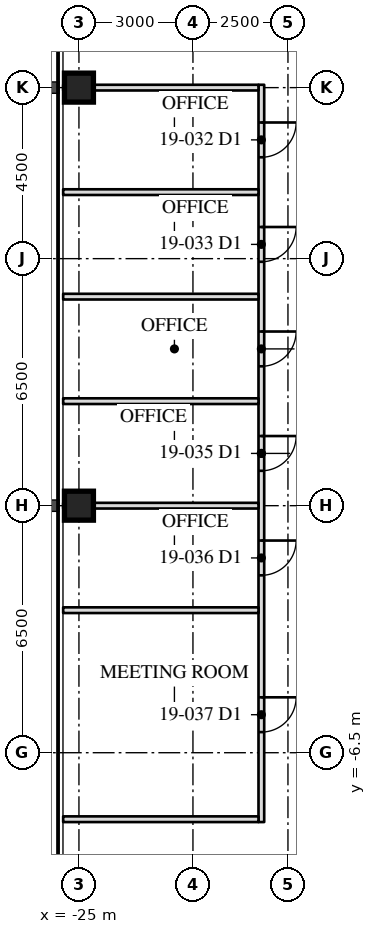
"""IFC4 building model, lengths in metres.
Left out: names, types, materials, properties, quantities, classifications, styles, units other than length and angle.
Written with IfcOpenShell. Run it as: python <this file> out.ifc"""

import sys

from ifc_helpers import new_model, si_unit, direction, frame, frame_2d, origin, origin_2d, place, context, subcontext, project, spatial, rectangle, hollow_rectangle, extrude, element, fill, save


model = new_model("IFC4")
c1 = context("Model", 3, precision=1e-05, world=origin(), true_north=direction((0.0, 1.0)))
c2 = subcontext(c1, "Body", "Model", "MODEL_VIEW")
j1 = project(units=[si_unit("LENGTHUNIT", "METRE"), si_unit("PLANEANGLEUNIT", "RADIAN")], contexts=[c1])
p1 = place(None, origin())
s1 = spatial("IfcSite", under=j1, at=p1, CompositionType="ELEMENT")
p2 = place(p1, origin())
s2 = spatial("IfcBuilding", under=s1, at=p2, CompositionType="ELEMENT")
p3 = place(p2, frame((0.0, 0.0, 81.6)))
s3 = spatial("IfcBuildingStorey", under=s2, at=p3, CompositionType="ELEMENT", Elevation=81.6)
for number, where, z_axis, x_axis in (
    (1, (-25.0, 0.0, 0.0), (0.0, 0.0, 1.0), (0.0, 1.0, 0.0)),
    (2, (-25.0, 11.0, 0.0), (0.0, 0.0, 1.0), (0.0, 1.0, 0.0)),
):
    element("IfcColumn", number, at=place(p3, frame(where, z_axis=z_axis, x_axis=x_axis)), inside=s3, PredefinedType="COLUMN", context=c2, shape_type="SweptSolid", body=[
        extrude(hollow_rectangle(XDim=0.762, YDim=0.762, WallThickness=0.127, at=origin_2d()), origin(), (0.0, 0.0, 1.0), 4.1),
    ])
p4 = place(p3, frame((-20.2, 11.075, 0.0), z_axis=(0.0, 0.0, 1.0), x_axis=(0.0, -1.0, 0.0)))
e3 = element("IfcWall", 3, at=p4, inside=s3, PredefinedType="PARTITIONING", context=c2, shape_type="SweptSolid", body=[
    extrude(rectangle(XDim=19.4, YDim=0.15, at=frame_2d((9.7, 0.0))), origin(), (0.0, 0.0, 1.0), 3.91),
])
p5 = place(p4, frame((0.992, 0.0, 0.0)))
e4 = element("IfcOpeningElement", 4, at=p5, cuts=e3, PredefinedType="OPENING", context=c2, shape_type="SweptSolid", body=[
    extrude(rectangle(XDim=0.915, YDim=2.134, at=frame_2d((0.458, 1.067))), frame((0.0, 0.085, 0.0), z_axis=(0.0, -1.0, 0.0), x_axis=(1.0, 0.0, 0.0)), (0.0, 0.0, 1.0), 0.17),
])
p6 = place(p4, frame((3.742, 0.0, 0.0)))
e5 = element("IfcOpeningElement", 5, at=p6, cuts=e3, PredefinedType="OPENING", context=c2, shape_type="SweptSolid", body=[
    extrude(rectangle(XDim=0.915, YDim=2.134, at=frame_2d((0.458, 1.067))), frame((0.0, 0.085, 0.0), z_axis=(0.0, -1.0, 0.0), x_axis=(1.0, 0.0, 0.0)), (0.0, 0.0, 1.0), 0.17),
])
p7 = place(p4, frame((6.492, 0.0, 0.0)))
e6 = element("IfcOpeningElement", 6, at=p7, cuts=e3, PredefinedType="OPENING", context=c2, shape_type="SweptSolid", body=[
    extrude(rectangle(XDim=0.915, YDim=2.134, at=frame_2d((0.458, 1.067))), frame((0.0, 0.085, 0.0), z_axis=(0.0, -1.0, 0.0), x_axis=(1.0, 0.0, 0.0)), (0.0, 0.0, 1.0), 0.17),
])
p8 = place(p4, frame((9.242, 0.0, 0.0)))
e7 = element("IfcOpeningElement", 7, at=p8, cuts=e3, PredefinedType="OPENING", context=c2, shape_type="SweptSolid", body=[
    extrude(rectangle(XDim=0.915, YDim=2.134, at=frame_2d((0.458, 1.067))), frame((0.0, 0.085, 0.0), z_axis=(0.0, -1.0, 0.0), x_axis=(1.0, 0.0, 0.0)), (0.0, 0.0, 1.0), 0.17),
])
p9 = place(p4, frame((11.992, 0.0, 0.0)))
e8 = element("IfcOpeningElement", 8, at=p9, cuts=e3, PredefinedType="OPENING", context=c2, shape_type="SweptSolid", body=[
    extrude(rectangle(XDim=0.915, YDim=2.134, at=frame_2d((0.458, 1.067))), frame((0.0, 0.085, 0.0), z_axis=(0.0, -1.0, 0.0), x_axis=(1.0, 0.0, 0.0)), (0.0, 0.0, 1.0), 0.17),
])
p10 = place(p4, frame((16.117, 0.0, 0.0)))
e9 = element("IfcOpeningElement", 9, at=p10, cuts=e3, PredefinedType="OPENING", context=c2, shape_type="SweptSolid", body=[
    extrude(rectangle(XDim=0.915, YDim=2.134, at=frame_2d((0.458, 1.067))), frame((0.0, 0.085, 0.0), z_axis=(0.0, -1.0, 0.0), x_axis=(1.0, 0.0, 0.0)), (0.0, 0.0, 1.0), 0.17),
])
p11 = place(p3, frame((-20.275, 11.0, 0.0), z_axis=(0.0, 0.0, 1.0), x_axis=(-1.0, 0.0, 0.0)))
e10 = element("IfcWall", 10, at=p11, inside=s3, PredefinedType="PARTITIONING", context=c2, shape_type="SweptSolid", body=[
    extrude(rectangle(XDim=5.14, YDim=0.15, at=frame_2d((2.57, 0.0))), origin(), (0.0, 0.0, 1.0), 3.13),
])
for number, where, z_axis, x_axis in (
    (11, (-20.275, 8.25, 0.0), (0.0, 0.0, 1.0), (-1.0, 0.0, 0.0)),
    (12, (-20.275, 5.5, 0.0), (0.0, 0.0, 1.0), (-1.0, 0.0, 0.0)),
    (13, (-20.275, 2.75, 0.0), (0.0, 0.0, 1.0), (-1.0, 0.0, 0.0)),
):
    element("IfcWall", number, at=place(p3, frame(where, z_axis=z_axis, x_axis=x_axis)), inside=s3, PredefinedType="PARTITIONING", context=c2, shape_type="SweptSolid", body=[
        extrude(rectangle(XDim=5.14, YDim=0.15, at=frame_2d((2.57, 0.0))), origin(), (0.0, 0.0, 1.0), 3.91),
    ])
p12 = place(p3, frame((-20.275, 0.0, 0.0), z_axis=(0.0, 0.0, 1.0), x_axis=(-1.0, 0.0, 0.0)))
e14 = element("IfcWall", 14, at=p12, inside=s3, PredefinedType="PARTITIONING", context=c2, shape_type="SweptSolid", body=[
    extrude(rectangle(XDim=5.14, YDim=0.15, at=frame_2d((2.57, 0.0))), origin(), (0.0, 0.0, 1.0), 3.13),
])
for number, where, z_axis, x_axis in (
    (15, (-20.275, -2.75, 0.0), (0.0, 0.0, 1.0), (-1.0, 0.0, 0.0)),
    (16, (-20.275, -8.25, 0.0), (0.0, 0.0, 1.0), (-1.0, 0.0, 0.0)),
):
    element("IfcWall", number, at=place(p3, frame(where, z_axis=z_axis, x_axis=x_axis)), inside=s3, PredefinedType="PARTITIONING", context=c2, shape_type="SweptSolid", body=[
        extrude(rectangle(XDim=5.14, YDim=0.15, at=frame_2d((2.57, 0.0))), origin(), (0.0, 0.0, 1.0), 3.91),
    ])
p13 = place(p5, origin())
e17 = element("IfcDoor", 17, at=p13, inside=s3, OperationType="SINGLE_SWING_LEFT", PredefinedType="DOOR", context=c2, shape_type="SweptSolid", body=[
    extrude(rectangle(XDim=0.915, YDim=2.134, at=frame_2d((0.458, 1.067))), frame((0.0, 0.025, 0.0), z_axis=(0.0, -1.0, 0.0), x_axis=(1.0, 0.0, 0.0)), (0.0, 0.0, 1.0), 0.05),
])
fill(e4, e17)
p14 = place(p6, origin())
e18 = element("IfcDoor", 18, at=p14, inside=s3, OperationType="SINGLE_SWING_LEFT", PredefinedType="DOOR", context=c2, shape_type="SweptSolid", body=[
    extrude(rectangle(XDim=0.915, YDim=2.134, at=frame_2d((0.458, 1.067))), frame((0.0, 0.025, 0.0), z_axis=(0.0, -1.0, 0.0), x_axis=(1.0, 0.0, 0.0)), (0.0, 0.0, 1.0), 0.05),
])
fill(e5, e18)
p15 = place(p7, origin())
e19 = element("IfcDoor", 19, at=p15, inside=s3, OperationType="SINGLE_SWING_LEFT", PredefinedType="DOOR", context=c2, shape_type="SweptSolid", body=[
    extrude(rectangle(XDim=0.915, YDim=2.134, at=frame_2d((0.458, 1.067))), frame((0.0, 0.025, 0.0), z_axis=(0.0, -1.0, 0.0), x_axis=(1.0, 0.0, 0.0)), (0.0, 0.0, 1.0), 0.05),
])
fill(e6, e19)
p16 = place(p8, origin())
e20 = element("IfcDoor", 20, at=p16, inside=s3, OperationType="SINGLE_SWING_LEFT", PredefinedType="DOOR", context=c2, shape_type="SweptSolid", body=[
    extrude(rectangle(XDim=0.915, YDim=2.134, at=frame_2d((0.458, 1.067))), frame((0.0, 0.025, 0.0), z_axis=(0.0, -1.0, 0.0), x_axis=(1.0, 0.0, 0.0)), (0.0, 0.0, 1.0), 0.05),
])
fill(e7, e20)
p17 = place(p9, origin())
e21 = element("IfcDoor", 21, at=p17, inside=s3, OperationType="SINGLE_SWING_LEFT", PredefinedType="DOOR", context=c2, shape_type="SweptSolid", body=[
    extrude(rectangle(XDim=0.915, YDim=2.134, at=frame_2d((0.458, 1.067))), frame((0.0, 0.025, 0.0), z_axis=(0.0, -1.0, 0.0), x_axis=(1.0, 0.0, 0.0)), (0.0, 0.0, 1.0), 0.05),
])
fill(e8, e21)
p18 = place(p10, origin())
e22 = element("IfcDoor", 22, at=p18, inside=s3, OperationType="SINGLE_SWING_LEFT", PredefinedType="DOOR", context=c2, shape_type="SweptSolid", body=[
    extrude(rectangle(XDim=0.915, YDim=2.134, at=frame_2d((0.458, 1.067))), frame((0.0, 0.025, 0.0), z_axis=(0.0, -1.0, 0.0), x_axis=(1.0, 0.0, 0.0)), (0.0, 0.0, 1.0), 0.05),
])
fill(e9, e22)
save(model, sys.argv[1])
